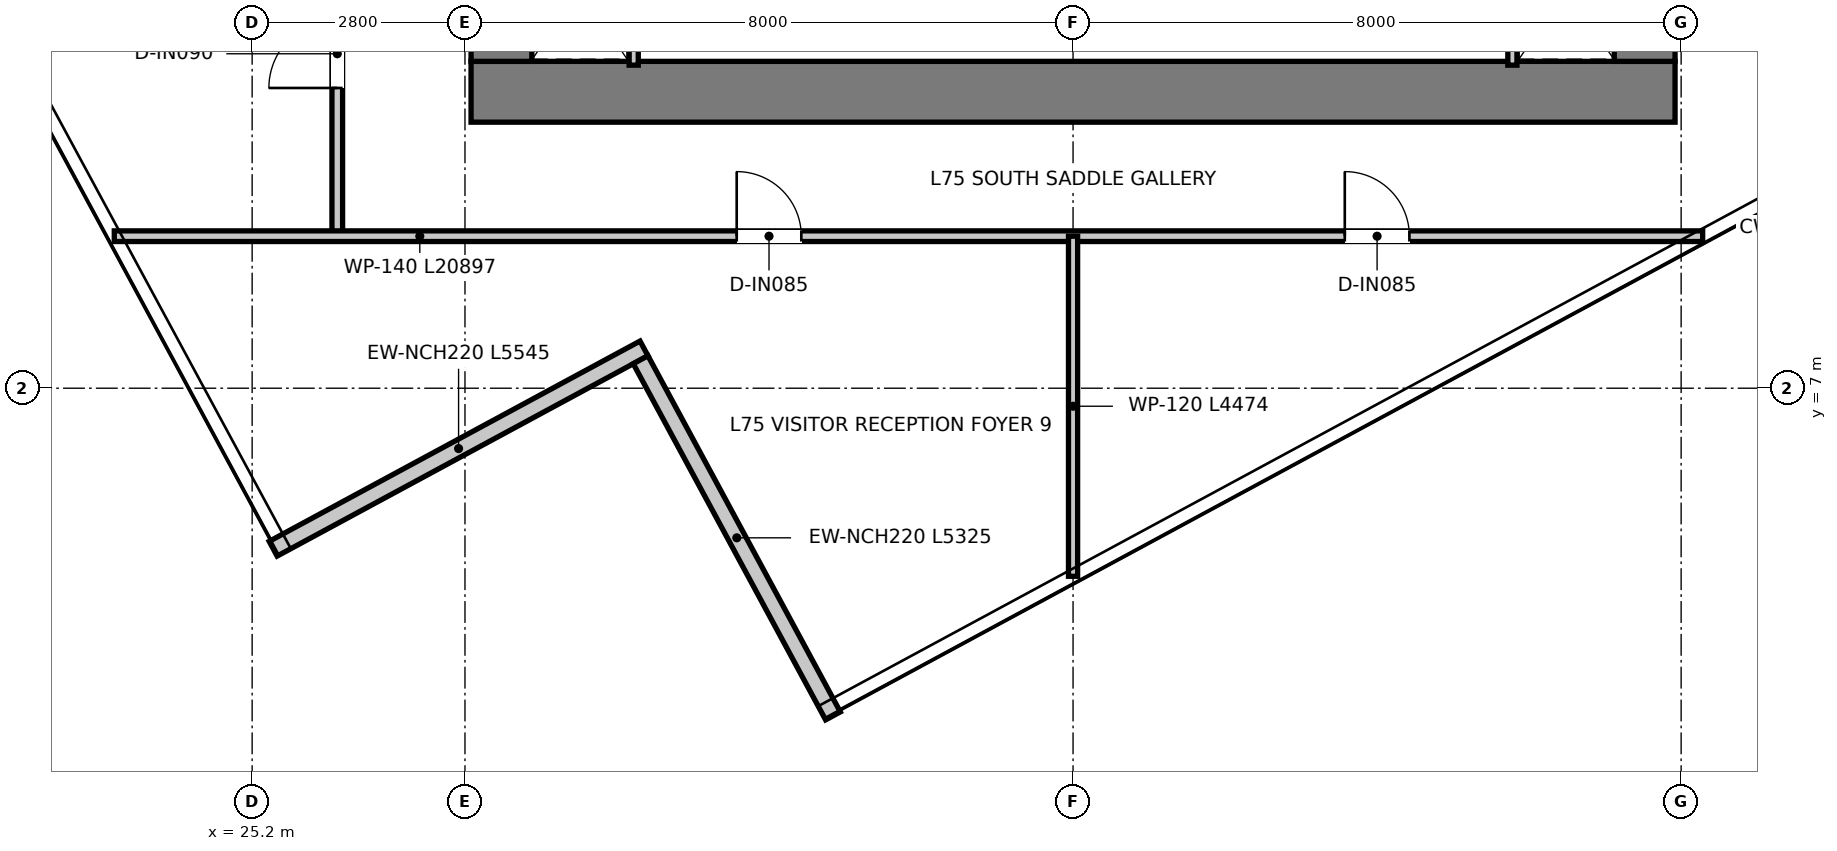
"""IFC4 building model, lengths in metres.
Left out: names, types, materials, properties, quantities, classifications, styles, units other than length and angle.
Written with IfcOpenShell. Run it as: python <this file> out.ifc"""

import sys

from ifc_helpers import new_model, si_unit, direction, frame, frame_2d, origin, place, context, subcontext, project, spatial, rectangle, extrude, element, fill, save


model = new_model("IFC4")
c1 = context("Model", 3, precision=1e-05, world=origin(), true_north=direction((0.0, 1.0)))
c2 = subcontext(c1, "Body", "Model", "MODEL_VIEW")
j1 = project(units=[si_unit("LENGTHUNIT", "METRE"), si_unit("PLANEANGLEUNIT", "RADIAN")], contexts=[c1])
p1 = place(None, origin())
s1 = spatial("IfcSite", under=j1, at=p1, CompositionType="ELEMENT")
p2 = place(p1, origin())
s2 = spatial("IfcBuilding", under=s1, at=p2, CompositionType="ELEMENT")
p3 = place(p2, frame((0.0, 0.0, 306.9)))
s3 = spatial("IfcBuildingStorey", under=s2, at=p3, CompositionType="ELEMENT", Elevation=306.9)
p4 = place(p3, frame((28.08, 10.9, 0.0), z_axis=(0.0, 0.0, 1.0), x_axis=(1.0, 0.0, 0.0)))
e1 = element("IfcWall", 1, at=p4, inside=s3, PredefinedType="SHEAR", context=c2, shape_type="SweptSolid", body=[
    extrude(rectangle(XDim=15.84, YDim=0.8, at=frame_2d((7.92, 0.0))), origin(), (0.0, 0.0, 1.0), 3.95),
])
for number, where, z_axis, x_axis in (
    (2, (28.48, 11.3, 0.0), (0.0, 0.0, 1.0), (0.0, 1.0, 0.0)),
    (3, (43.52, 11.3, 0.0), (0.0, 0.0, 1.0), (0.0, 1.0, 0.0)),
):
    element("IfcWall", number, at=place(p3, frame(where, z_axis=z_axis, x_axis=x_axis)), inside=s3, PredefinedType="SHEAR", context=c2, shape_type="SweptSolid", body=[
        extrude(rectangle(XDim=14.7, YDim=0.8, at=frame_2d((7.35, 0.0))), origin(), (0.0, 0.0, 1.0), 3.95),
    ])
p5 = place(p3, frame((25.477, 4.888, 0.0), z_axis=(0.0, 0.0, 1.0), x_axis=(0.879846852796, 0.475257315172, 0.0)))
e4 = element("IfcWall", 4, at=p5, inside=s3, PredefinedType="ELEMENTEDWALL", context=c2, shape_type="SweptSolid", body=[
    extrude(rectangle(XDim=5.545, YDim=0.22, at=frame_2d((2.772, 0.0))), origin(), (0.0, 0.0, 1.0), 3.67),
])
p6 = place(p3, frame((30.311, 7.375, 0.0), z_axis=(0.0, 0.0, 1.0), x_axis=(0.475250431035, -0.879850571291, 0.0)))
e5 = element("IfcWall", 5, at=p6, inside=s3, PredefinedType="ELEMENTEDWALL", context=c2, shape_type="SweptSolid", body=[
    extrude(rectangle(XDim=5.325, YDim=0.22, at=frame_2d((2.663, 0.0))), origin(), (0.0, 0.0, 1.0), 3.67),
])
for number, where, z_axis, x_axis in (
    (6, (30.22, 11.25, 0.0), (0.0, 0.0, 1.0), (0.0, 1.0, 0.0)),
    (7, (41.78, 11.25, 0.0), (0.0, 0.0, 1.0), (0.0, 1.0, 0.0)),
):
    element("IfcWall", number, at=place(p3, frame(where, z_axis=z_axis, x_axis=x_axis)), inside=s3, PredefinedType="PARTITIONING", context=c2, shape_type="SweptSolid", body=[
        extrude(rectangle(XDim=1.97, YDim=0.12, at=frame_2d((0.985, 0.0))), origin(), (0.0, 0.0, 1.0), 3.67),
    ])
p7 = place(p3, frame((26.32, 9.0, 0.0), z_axis=(0.0, 0.0, 1.0), x_axis=(0.0, 1.0, 0.0)))
e8 = element("IfcWall", 8, at=p7, inside=s3, PredefinedType="PARTITIONING", context=c2, shape_type="SweptSolid", body=[
    extrude(rectangle(XDim=19.66, YDim=0.14, at=frame_2d((9.83, 0.0))), origin(), (0.0, 0.0, 1.0), 3.13),
])
p8 = place(p7, frame((18.3, 0.0, 0.0)))
e9 = element("IfcOpeningElement", 9, at=p8, cuts=e8, PredefinedType="OPENING", context=c2, shape_type="SweptSolid", body=[
    extrude(rectangle(XDim=0.9, YDim=2.1, at=frame_2d((0.45, 1.05))), frame((0.0, 0.08, 0.0), z_axis=(0.0, -1.0, 0.0), x_axis=(1.0, 0.0, 0.0)), (0.0, 0.0, 1.0), 0.16),
])
p9 = place(p7, frame((1.95, 0.0, 0.0)))
e10 = element("IfcOpeningElement", 10, at=p9, cuts=e8, PredefinedType="OPENING", context=c2, shape_type="SweptSolid", body=[
    extrude(rectangle(XDim=0.9, YDim=2.1, at=frame_2d((0.45, 1.05))), frame((0.0, 0.08, 0.0), z_axis=(0.0, -1.0, 0.0), x_axis=(1.0, 0.0, 0.0)), (0.0, 0.0, 1.0), 0.16),
])
p10 = place(p7, frame((10.3, 0.0, 0.0)))
e11 = element("IfcOpeningElement", 11, at=p10, cuts=e8, PredefinedType="OPENING", context=c2, shape_type="SweptSolid", body=[
    extrude(rectangle(XDim=0.9, YDim=2.1, at=frame_2d((0.45, 1.05))), frame((0.0, 0.08, 0.0), z_axis=(0.0, -1.0, 0.0), x_axis=(1.0, 0.0, 0.0)), (0.0, 0.0, 1.0), 0.16),
])
p11 = place(p7, frame((14.96, 0.0, 0.0)))
e12 = element("IfcOpeningElement", 12, at=p11, cuts=e8, PredefinedType="OPENING", context=c2, shape_type="SweptSolid", body=[
    extrude(rectangle(XDim=0.9, YDim=2.1, at=frame_2d((0.45, 1.05))), frame((0.0, 0.08, 0.0), z_axis=(0.0, -1.0, 0.0), x_axis=(1.0, 0.0, 0.0)), (0.0, 0.0, 1.0), 0.16),
])
p12 = place(p3, frame((23.386, 9.0, 0.0), z_axis=(0.0, 0.0, 1.0), x_axis=(1.0, 0.0, 0.0)))
e13 = element("IfcWall", 13, at=p12, inside=s3, PredefinedType="PARTITIONING", context=c2, shape_type="SweptSolid", body=[
    extrude(rectangle(XDim=20.897, YDim=0.14, at=frame_2d((10.448, 0.0))), origin(), (0.0, 0.0, 1.0), 3.67),
])
p13 = place(p12, frame((8.189, 0.0, 0.0)))
e14 = element("IfcOpeningElement", 14, at=p13, cuts=e13, PredefinedType="OPENING", context=c2, shape_type="SweptSolid", body=[
    extrude(rectangle(XDim=0.85, YDim=2.1, at=frame_2d((0.425, 1.05))), frame((0.0, 0.08, 0.0), z_axis=(0.0, -1.0, 0.0), x_axis=(1.0, 0.0, 0.0)), (0.0, 0.0, 1.0), 0.16),
])
p14 = place(p12, frame((16.189, 0.0, 0.0)))
e15 = element("IfcOpeningElement", 15, at=p14, cuts=e13, PredefinedType="OPENING", context=c2, shape_type="SweptSolid", body=[
    extrude(rectangle(XDim=0.85, YDim=2.1, at=frame_2d((0.425, 1.05))), frame((0.0, 0.08, 0.0), z_axis=(0.0, -1.0, 0.0), x_axis=(1.0, 0.0, 0.0)), (0.0, 0.0, 1.0), 0.16),
])
p15 = place(p3, frame((36.0, 4.526, 0.0), z_axis=(0.0, 0.0, 1.0), x_axis=(0.0, 1.0, 0.0)))
e16 = element("IfcWall", 16, at=p15, inside=s3, PredefinedType="PARTITIONING", context=c2, shape_type="SweptSolid", body=[
    extrude(rectangle(XDim=4.474, YDim=0.12, at=frame_2d((2.237, 0.0))), origin(), (0.0, 0.0, 1.0), 3.67),
])
p16 = place(p9, origin())
e17 = element("IfcDoor", 17, at=p16, inside=s3, OperationType="SINGLE_SWING_LEFT", PredefinedType="DOOR", context=c2, shape_type="SweptSolid", body=[
    extrude(rectangle(XDim=0.9, YDim=2.1, at=frame_2d((0.45, 1.05))), frame((0.0, 0.025, 0.0), z_axis=(0.0, -1.0, 0.0), x_axis=(1.0, 0.0, 0.0)), (0.0, 0.0, 1.0), 0.05),
])
fill(e10, e17)
p17 = place(p13, origin())
e18 = element("IfcDoor", 18, at=p17, inside=s3, OperationType="SINGLE_SWING_LEFT", PredefinedType="DOOR", context=c2, shape_type="SweptSolid", body=[
    extrude(rectangle(XDim=0.85, YDim=2.1, at=frame_2d((0.425, 1.05))), frame((0.0, 0.025, 0.0), z_axis=(0.0, -1.0, 0.0), x_axis=(1.0, 0.0, 0.0)), (0.0, 0.0, 1.0), 0.05),
])
fill(e14, e18)
p18 = place(p14, origin())
e19 = element("IfcDoor", 19, at=p18, inside=s3, OperationType="SINGLE_SWING_LEFT", PredefinedType="DOOR", context=c2, shape_type="SweptSolid", body=[
    extrude(rectangle(XDim=0.85, YDim=2.1, at=frame_2d((0.425, 1.05))), frame((0.0, 0.025, 0.0), z_axis=(0.0, -1.0, 0.0), x_axis=(1.0, 0.0, 0.0)), (0.0, 0.0, 1.0), 0.05),
])
fill(e15, e19)
save(model, sys.argv[1])
